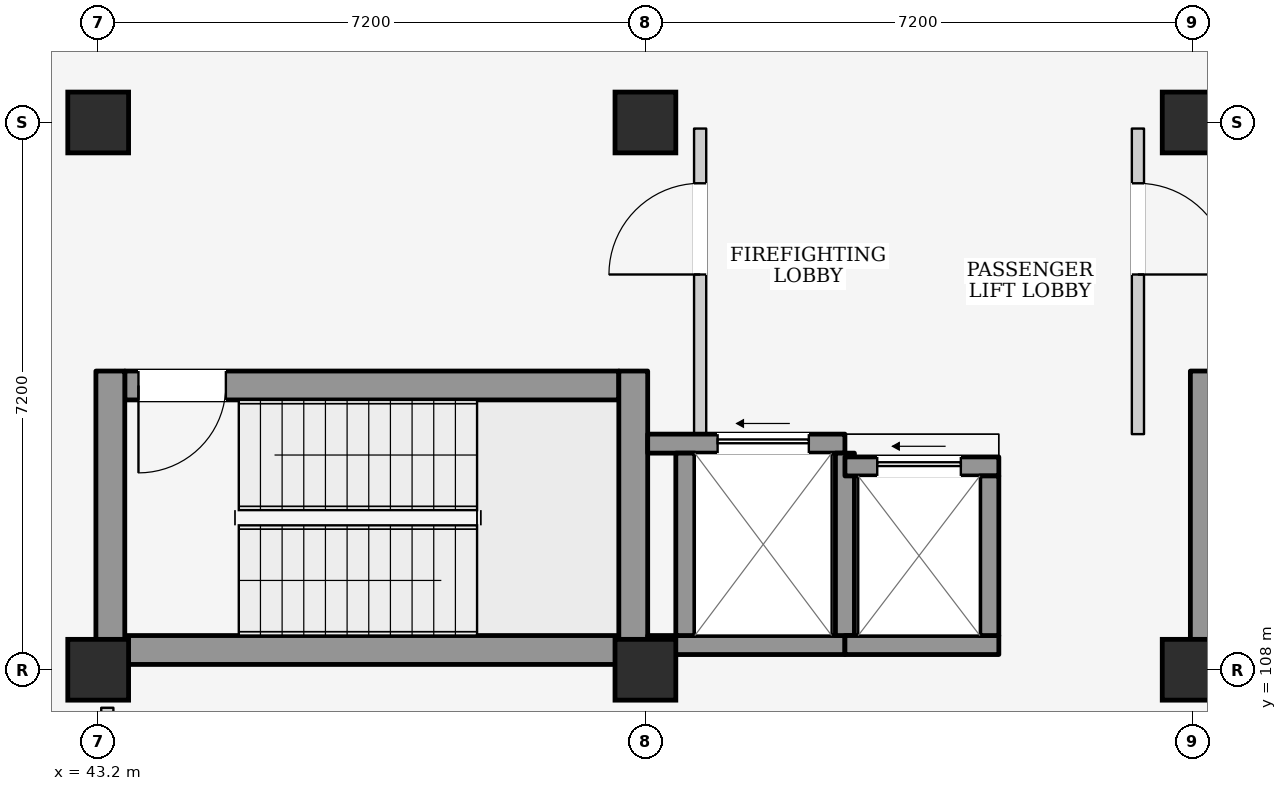
"""IFC4 building model, lengths in metres.
Left out: names, types, materials, properties, quantities, classifications, styles, units other than length and angle.
Written with IfcOpenShell. Run it as: python <this file> out.ifc"""

import sys

from ifc_helpers import new_model, si_unit, direction, frame, frame_2d, origin, origin_2d, place, context, subcontext, project, spatial, rectangle, extrude, element, fill, save


model = new_model("IFC4")
c1 = context("Model", 3, precision=1e-05, world=origin(), true_north=direction((0.0, 1.0)))
c2 = subcontext(c1, "Body", "Model", "MODEL_VIEW")
j1 = project(units=[si_unit("LENGTHUNIT", "METRE"), si_unit("PLANEANGLEUNIT", "RADIAN")], contexts=[c1])
p1 = place(None, origin())
s1 = spatial("IfcSite", under=j1, at=p1, CompositionType="ELEMENT")
p2 = place(p1, origin())
s2 = spatial("IfcBuilding", under=s1, at=p2, CompositionType="ELEMENT")
p3 = place(p2, frame((0.0, 0.0, -4.2)))
s3 = spatial("IfcBuildingStorey", under=s2, at=p3, CompositionType="ELEMENT", Elevation=-4.2)
for number, where, z_axis, x_axis in (
    (1, (43.2, 108.0, 0.0), (0.0, 0.0, 1.0), (1.0, 0.0, 0.0)),
    (2, (43.2, 115.2, 0.0), (0.0, 0.0, 1.0), (1.0, 0.0, 0.0)),
    (3, (50.4, 108.0, 0.0), (0.0, 0.0, 1.0), (1.0, 0.0, 0.0)),
    (4, (50.4, 115.2, 0.0), (0.0, 0.0, 1.0), (1.0, 0.0, 0.0)),
    (5, (57.6, 108.0, 0.0), (0.0, 0.0, 1.0), (1.0, 0.0, 0.0)),
    (6, (57.6, 115.2, 0.0), (0.0, 0.0, 1.0), (1.0, 0.0, 0.0)),
):
    element("IfcColumn", number, at=place(p3, frame(where, z_axis=z_axis, x_axis=x_axis)), inside=s3, PredefinedType="COLUMN", context=c2, shape_type="SweptSolid", body=[
        extrude(rectangle(XDim=0.8, YDim=0.8, at=origin_2d()), origin(), (0.0, 0.0, 1.0), 4.2),
    ])
p4 = place(p3, frame((43.55, 108.26, 0.0), z_axis=(0.0, 0.0, 1.0), x_axis=(1.0, 0.0, 0.0)))
e7 = element("IfcWall", 7, at=p4, inside=s3, PredefinedType="SHEAR", context=c2, shape_type="SweptSolid", body=[
    extrude(rectangle(XDim=6.5, YDim=0.38, at=frame_2d((3.25, 0.0))), origin(), (0.0, 0.0, 1.0), 3.79),
])
p5 = place(p3, frame((43.55, 111.74, 0.0), z_axis=(0.0, 0.0, 1.0), x_axis=(1.0, 0.0, 0.0)))
e8 = element("IfcWall", 8, at=p5, inside=s3, PredefinedType="SHEAR", context=c2, shape_type="SweptSolid", body=[
    extrude(rectangle(XDim=6.5, YDim=0.38, at=frame_2d((3.25, 0.0))), origin(), (0.0, 0.0, 1.0), 3.79),
])
p6 = place(p5, frame((0.18, 0.0, 0.0)))
e9 = element("IfcOpeningElement", 9, at=p6, cuts=e8, PredefinedType="OPENING", context=c2, shape_type="SweptSolid", body=[
    extrude(rectangle(XDim=1.15, YDim=2.2, at=frame_2d((0.575, 1.1))), frame((0.0, 0.205, 0.0), z_axis=(0.0, -1.0, 0.0), x_axis=(1.0, 0.0, 0.0)), (0.0, 0.0, 1.0), 0.41),
])
for number, where, z_axis, x_axis in (
    (10, (43.36, 108.07, 0.0), (0.0, 0.0, 1.0), (0.0, 1.0, 0.0)),
    (11, (50.24, 108.07, 0.0), (0.0, 0.0, 1.0), (0.0, 1.0, 0.0)),
):
    element("IfcWall", number, at=place(p3, frame(where, z_axis=z_axis, x_axis=x_axis)), inside=s3, PredefinedType="SHEAR", context=c2, shape_type="SweptSolid", body=[
        extrude(rectangle(XDim=3.86, YDim=0.38, at=frame_2d((1.93, 0.0))), origin(), (0.0, 0.0, 1.0), 3.79),
    ])
p7 = place(p3, frame((51.12, 111.1, 0.0), z_axis=(0.0, 0.0, 1.0), x_axis=(0.0, 1.0, 0.0)))
e12 = element("IfcWall", 12, at=p7, inside=s3, PredefinedType="PARTITIONING", context=c2, shape_type="SweptSolid", body=[
    extrude(rectangle(XDim=4.02, YDim=0.16, at=frame_2d((2.01, 0.0))), origin(), (0.0, 0.0, 1.0), 3.79),
])
p8 = place(p7, frame((2.1, 0.0, 0.0)))
e13 = element("IfcOpeningElement", 13, at=p8, cuts=e12, PredefinedType="OPENING", context=c2, shape_type="SweptSolid", body=[
    extrude(rectangle(XDim=1.2, YDim=2.2, at=frame_2d((0.6, 1.1))), frame((0.0, 0.095, 0.0), z_axis=(0.0, -1.0, 0.0), x_axis=(1.0, 0.0, 0.0)), (0.0, 0.0, 1.0), 0.19),
])
p9 = place(p3, frame((56.88, 111.1, 0.0), z_axis=(0.0, 0.0, 1.0), x_axis=(0.0, 1.0, 0.0)))
e14 = element("IfcWall", 14, at=p9, inside=s3, PredefinedType="PARTITIONING", context=c2, shape_type="SweptSolid", body=[
    extrude(rectangle(XDim=4.02, YDim=0.16, at=frame_2d((2.01, 0.0))), origin(), (0.0, 0.0, 1.0), 3.79),
])
p10 = place(p9, frame((2.1, 0.0, 0.0)))
e15 = element("IfcOpeningElement", 15, at=p10, cuts=e14, PredefinedType="OPENING", context=c2, shape_type="SweptSolid", body=[
    extrude(rectangle(XDim=1.2, YDim=2.2, at=frame_2d((0.6, 1.1))), frame((0.0, 0.095, 0.0), z_axis=(0.0, -1.0, 0.0), x_axis=(1.0, 0.0, 0.0)), (0.0, 0.0, 1.0), 0.19),
])
p11 = place(p3, frame((50.43, 108.325, 0.0), z_axis=(0.0, 0.0, 1.0), x_axis=(1.0, 0.0, 0.0)))
e16 = element("IfcWall", 16, at=p11, inside=s3, PredefinedType="SHEAR", context=c2, shape_type="SweptSolid", body=[
    extrude(rectangle(XDim=2.595, YDim=0.25, at=frame_2d((1.297, 0.0))), origin(), (0.0, 0.0, 1.0), 3.79),
])
p12 = place(p3, frame((50.43, 110.975, 0.0), z_axis=(0.0, 0.0, 1.0), x_axis=(1.0, 0.0, 0.0)))
e17 = element("IfcWall", 17, at=p12, inside=s3, PredefinedType="SHEAR", context=c2, shape_type="SweptSolid", body=[
    extrude(rectangle(XDim=2.595, YDim=0.25, at=frame_2d((1.297, 0.0))), origin(), (0.0, 0.0, 1.0), 3.79),
])
p13 = place(p12, frame((0.92, 0.0, 0.0)))
e18 = element("IfcOpeningElement", 18, at=p13, cuts=e17, PredefinedType="OPENING", context=c2, shape_type="SweptSolid", body=[
    extrude(rectangle(XDim=1.2, YDim=2.25, at=frame_2d((0.6, 1.125))), frame((0.0, 0.14, 0.0), z_axis=(0.0, -1.0, 0.0), x_axis=(1.0, 0.0, 0.0)), (0.0, 0.0, 1.0), 0.28),
])
for number, where, z_axis, x_axis in (
    (19, (50.925, 108.45, 0.0), (0.0, 0.0, 1.0), (0.0, 1.0, 0.0)),
    (20, (53.025, 108.45, 0.0), (0.0, 0.0, 1.0), (0.0, 1.0, 0.0)),
):
    element("IfcWall", number, at=place(p3, frame(where, z_axis=z_axis, x_axis=x_axis)), inside=s3, PredefinedType="SHEAR", context=c2, shape_type="SweptSolid", body=[
        extrude(rectangle(XDim=2.4, YDim=0.25, at=frame_2d((1.2, 0.0))), origin(), (0.0, 0.0, 1.0), 3.79),
    ])
p14 = place(p3, frame((53.025, 108.325, 0.0), z_axis=(0.0, 0.0, 1.0), x_axis=(1.0, 0.0, 0.0)))
e21 = element("IfcWall", 21, at=p14, inside=s3, PredefinedType="SHEAR", context=c2, shape_type="SweptSolid", body=[
    extrude(rectangle(XDim=2.025, YDim=0.25, at=frame_2d((1.013, 0.0))), origin(), (0.0, 0.0, 1.0), 3.79),
])
p15 = place(p3, frame((53.025, 110.675, 0.0), z_axis=(0.0, 0.0, 1.0), x_axis=(1.0, 0.0, 0.0)))
e22 = element("IfcWall", 22, at=p15, inside=s3, PredefinedType="SHEAR", context=c2, shape_type="SweptSolid", body=[
    extrude(rectangle(XDim=2.025, YDim=0.25, at=frame_2d((1.013, 0.0))), origin(), (0.0, 0.0, 1.0), 3.79),
])
p16 = place(p15, frame((0.425, 0.0, 0.0)))
e23 = element("IfcOpeningElement", 23, at=p16, cuts=e22, PredefinedType="OPENING", context=c2, shape_type="SweptSolid", body=[
    extrude(rectangle(XDim=1.1, YDim=2.15, at=frame_2d((0.55, 1.075))), frame((0.0, 0.14, 0.0), z_axis=(0.0, -1.0, 0.0), x_axis=(1.0, 0.0, 0.0)), (0.0, 0.0, 1.0), 0.28),
])
p17 = place(p3, frame((54.925, 108.45, 0.0), z_axis=(0.0, 0.0, 1.0), x_axis=(0.0, 1.0, 0.0)))
e24 = element("IfcWall", 24, at=p17, inside=s3, PredefinedType="SHEAR", context=c2, shape_type="SweptSolid", body=[
    extrude(rectangle(XDim=2.1, YDim=0.25, at=frame_2d((1.05, 0.0))), origin(), (0.0, 0.0, 1.0), 3.79),
])
p18 = place(p3, frame((57.76, 108.07, 0.0), z_axis=(0.0, 0.0, 1.0), x_axis=(0.0, 1.0, 0.0)))
e25 = element("IfcWall", 25, at=p18, inside=s3, PredefinedType="SHEAR", context=c2, shape_type="SweptSolid", body=[
    extrude(rectangle(XDim=3.86, YDim=0.38, at=frame_2d((1.93, 0.0))), origin(), (0.0, 0.0, 1.0), 3.79),
])
p19 = place(p3, frame((43.32, 101.18, 0.0), z_axis=(0.0, 0.0, 1.0), x_axis=(0.0, 1.0, 0.0)))
e26 = element("IfcWall", 26, at=p19, inside=s3, PredefinedType="PARTITIONING", context=c2, shape_type="SweptSolid", body=[
    extrude(rectangle(XDim=6.32, YDim=0.16, at=frame_2d((3.16, 0.0))), origin(), (0.0, 0.0, 1.0), 3.79),
])
p20 = place(p6, frame((1.15, 0.0, 0.0), z_axis=(0.0, 0.0, 1.0), x_axis=(-1.0, 0.0, 0.0)))
e27 = element("IfcDoor", 27, at=p20, inside=s3, OperationType="SINGLE_SWING_RIGHT", PredefinedType="DOOR", context=c2, shape_type="SweptSolid", body=[
    extrude(rectangle(XDim=1.15, YDim=2.2, at=frame_2d((0.575, 1.1))), frame((0.0, 0.025, 0.0), z_axis=(0.0, -1.0, 0.0), x_axis=(1.0, 0.0, 0.0)), (0.0, 0.0, 1.0), 0.05),
])
fill(e9, e27)
p21 = place(p8, origin())
e28 = element("IfcDoor", 28, at=p21, inside=s3, OperationType="SINGLE_SWING_LEFT", PredefinedType="DOOR", context=c2, shape_type="SweptSolid", body=[
    extrude(rectangle(XDim=1.2, YDim=2.2, at=frame_2d((0.6, 1.1))), frame((0.0, 0.025, 0.0), z_axis=(0.0, -1.0, 0.0), x_axis=(1.0, 0.0, 0.0)), (0.0, 0.0, 1.0), 0.05),
])
fill(e13, e28)
p22 = place(p10, frame((1.2, 0.0, 0.0), z_axis=(0.0, 0.0, 1.0), x_axis=(-1.0, 0.0, 0.0)))
e29 = element("IfcDoor", 29, at=p22, inside=s3, OperationType="SINGLE_SWING_RIGHT", PredefinedType="DOOR", context=c2, shape_type="SweptSolid", body=[
    extrude(rectangle(XDim=1.2, YDim=2.2, at=frame_2d((0.6, 1.1))), frame((0.0, 0.025, 0.0), z_axis=(0.0, -1.0, 0.0), x_axis=(1.0, 0.0, 0.0)), (0.0, 0.0, 1.0), 0.05),
])
fill(e15, e29)
p23 = place(p13, origin())
e30 = element("IfcDoor", 30, at=p23, inside=s3, OperationType="SLIDING_TO_LEFT", PredefinedType="DOOR", context=c2, shape_type="SweptSolid", body=[
    extrude(rectangle(XDim=1.2, YDim=2.25, at=frame_2d((0.6, 1.125))), frame((0.0, 0.025, 0.0), z_axis=(0.0, -1.0, 0.0), x_axis=(1.0, 0.0, 0.0)), (0.0, 0.0, 1.0), 0.05),
])
fill(e18, e30)
p24 = place(p16, origin())
e31 = element("IfcDoor", 31, at=p24, inside=s3, OperationType="SLIDING_TO_LEFT", PredefinedType="DOOR", context=c2, shape_type="SweptSolid", body=[
    extrude(rectangle(XDim=1.1, YDim=2.15, at=frame_2d((0.55, 1.075))), frame((0.0, 0.025, 0.0), z_axis=(0.0, -1.0, 0.0), x_axis=(1.0, 0.0, 0.0)), (0.0, 0.0, 1.0), 0.05),
])
fill(e23, e31)
save(model, sys.argv[1])
